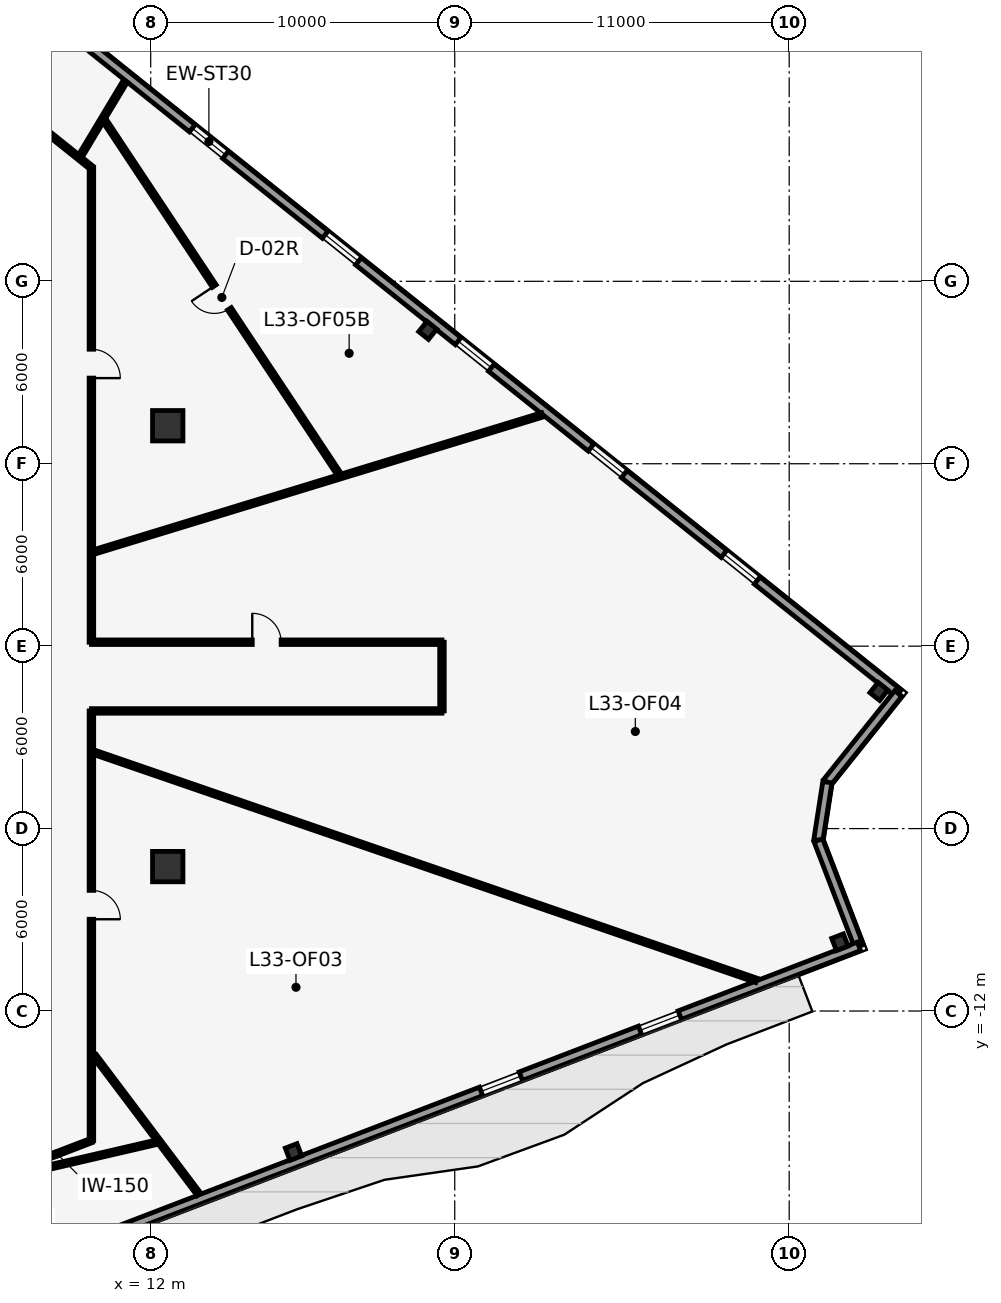
"""IFC4 building model, lengths in metres.
Left out: names, types, materials, properties, quantities, classifications, styles, units other than length and angle.
Written with IfcOpenShell. Run it as: python <this file> out.ifc"""

import sys

from ifc_helpers import new_model, si_unit, direction, frame, frame_2d, origin, origin_2d, place, context, subcontext, project, spatial, rectangle, i_section, extrude, element, fill, save


model = new_model("IFC4")
c1 = context("Model", 3, precision=1e-05, world=origin(), true_north=direction((0.0, 1.0)))
c2 = subcontext(c1, "Body", "Model", "MODEL_VIEW")
j1 = project(units=[si_unit("LENGTHUNIT", "METRE"), si_unit("PLANEANGLEUNIT", "RADIAN")], contexts=[c1])
p1 = place(None, origin())
s1 = spatial("IfcSite", under=j1, at=p1, CompositionType="ELEMENT")
p2 = place(p1, origin())
s2 = spatial("IfcBuilding", under=s1, at=p2, CompositionType="ELEMENT")
p3 = place(p2, frame((0.0, 0.0, 144.5)))
s3 = spatial("IfcBuildingStorey", under=s2, at=p3, CompositionType="ELEMENT", Elevation=144.5)
for number, where, z_axis, x_axis in (
    (1, (12.56, -7.25, 0.0), (0.0, 0.0, 1.0), (1.0, 0.0, 0.0)),
    (2, (12.56, 7.25, 0.0), (0.0, 0.0, 1.0), (1.0, 0.0, 0.0)),
):
    element("IfcColumn", number, at=place(p3, frame(where, z_axis=z_axis, x_axis=x_axis)), inside=s3, PredefinedType="COLUMN", context=c2, shape_type="SweptSolid", body=[
        extrude(rectangle(XDim=1.0, YDim=1.0, at=origin_2d()), origin(), (0.0, 0.0, 1.0), 4.1),
    ])
for number, where, z_axis, x_axis in (
    (3, (16.697, -16.638, 0.0), (0.0, 0.0, 1.0), (0.934, 0.358, 0.0)),
    (4, (34.669, -9.739, 0.0), (0.0, 0.0, 1.0), (0.934, 0.358, 0.0)),
    (5, (35.951, -1.489, 0.0), (0.0, 0.0, 1.0), (-0.781, 0.625, 0.0)),
    (6, (21.112, 10.387, 0.0), (0.0, 0.0, 1.0), (-0.781, 0.625, 0.0)),
):
    element("IfcColumn", number, at=place(p3, frame(where, z_axis=z_axis, x_axis=x_axis)), inside=s3, PredefinedType="COLUMN", context=c2, shape_type="SweptSolid", body=[
        extrude(i_section(OverallWidth=0.411, OverallDepth=0.434, WebThickness=0.036, FlangeThickness=0.057, at=origin_2d()), origin(), (0.0, 0.0, 1.0), 4.1),
    ])
p4 = place(p3, frame((-8.762, 34.748, 0.0), z_axis=(0.0, 0.0, 1.0), x_axis=(0.780669916438, -0.624943582708, 0.0)))
e7 = element("IfcWall", 7, at=p4, inside=s3, PredefinedType="STANDARD", context=c2, shape_type="SweptSolid", body=[
    extrude(rectangle(XDim=58.093, YDim=0.3, at=frame_2d((29.046, 0.0))), origin(), (0.0, 0.0, 1.0), 3.85),
])
p5 = place(p4, frame((5.947, 0.0, 0.85)))
e8 = element("IfcOpeningElement", 8, at=p5, cuts=e7, PredefinedType="OPENING", context=c2, shape_type="SweptSolid", body=[
    extrude(rectangle(XDim=1.4, YDim=2.2, at=frame_2d((0.7, 1.1))), frame((0.0, 0.16, 0.0), z_axis=(0.0, -1.0, 0.0), x_axis=(1.0, 0.0, 0.0)), (0.0, 0.0, 1.0), 0.32),
])
p6 = place(p4, frame((11.547, 0.0, 0.85)))
e9 = element("IfcOpeningElement", 9, at=p6, cuts=e7, PredefinedType="OPENING", context=c2, shape_type="SweptSolid", body=[
    extrude(rectangle(XDim=1.4, YDim=2.2, at=frame_2d((0.7, 1.1))), frame((0.0, 0.16, 0.0), z_axis=(0.0, -1.0, 0.0), x_axis=(1.0, 0.0, 0.0)), (0.0, 0.0, 1.0), 0.32),
])
p7 = place(p4, frame((17.146, 0.0, 0.85)))
e10 = element("IfcOpeningElement", 10, at=p7, cuts=e7, PredefinedType="OPENING", context=c2, shape_type="SweptSolid", body=[
    extrude(rectangle(XDim=1.4, YDim=2.2, at=frame_2d((0.7, 1.1))), frame((0.0, 0.16, 0.0), z_axis=(0.0, -1.0, 0.0), x_axis=(1.0, 0.0, 0.0)), (0.0, 0.0, 1.0), 0.32),
])
p8 = place(p4, frame((22.747, 0.0, 0.85)))
e11 = element("IfcOpeningElement", 11, at=p8, cuts=e7, PredefinedType="OPENING", context=c2, shape_type="SweptSolid", body=[
    extrude(rectangle(XDim=1.4, YDim=2.2, at=frame_2d((0.7, 1.1))), frame((0.0, 0.16, 0.0), z_axis=(0.0, -1.0, 0.0), x_axis=(1.0, 0.0, 0.0)), (0.0, 0.0, 1.0), 0.32),
])
p9 = place(p4, frame((28.347, 0.0, 0.85)))
e12 = element("IfcOpeningElement", 12, at=p9, cuts=e7, PredefinedType="OPENING", context=c2, shape_type="SweptSolid", body=[
    extrude(rectangle(XDim=1.4, YDim=2.2, at=frame_2d((0.7, 1.1))), frame((0.0, 0.16, 0.0), z_axis=(0.0, -1.0, 0.0), x_axis=(1.0, 0.0, 0.0)), (0.0, 0.0, 1.0), 0.32),
])
p10 = place(p4, frame((33.947, 0.0, 0.85)))
e13 = element("IfcOpeningElement", 13, at=p10, cuts=e7, PredefinedType="OPENING", context=c2, shape_type="SweptSolid", body=[
    extrude(rectangle(XDim=1.4, YDim=2.2, at=frame_2d((0.7, 1.1))), frame((0.0, 0.16, 0.0), z_axis=(0.0, -1.0, 0.0), x_axis=(1.0, 0.0, 0.0)), (0.0, 0.0, 1.0), 0.32),
])
p11 = place(p4, frame((39.547, 0.0, 0.85)))
e14 = element("IfcOpeningElement", 14, at=p11, cuts=e7, PredefinedType="OPENING", context=c2, shape_type="SweptSolid", body=[
    extrude(rectangle(XDim=1.4, YDim=2.2, at=frame_2d((0.7, 1.1))), frame((0.0, 0.16, 0.0), z_axis=(0.0, -1.0, 0.0), x_axis=(1.0, 0.0, 0.0)), (0.0, 0.0, 1.0), 0.32),
])
p12 = place(p4, frame((45.146, 0.0, 0.85)))
e15 = element("IfcOpeningElement", 15, at=p12, cuts=e7, PredefinedType="OPENING", context=c2, shape_type="SweptSolid", body=[
    extrude(rectangle(XDim=1.4, YDim=2.2, at=frame_2d((0.7, 1.1))), frame((0.0, 0.16, 0.0), z_axis=(0.0, -1.0, 0.0), x_axis=(1.0, 0.0, 0.0)), (0.0, 0.0, 1.0), 0.32),
])
p13 = place(p4, frame((50.747, 0.0, 0.85)))
e16 = element("IfcOpeningElement", 16, at=p13, cuts=e7, PredefinedType="OPENING", context=c2, shape_type="SweptSolid", body=[
    extrude(rectangle(XDim=1.4, YDim=2.2, at=frame_2d((0.7, 1.1))), frame((0.0, 0.16, 0.0), z_axis=(0.0, -1.0, 0.0), x_axis=(1.0, 0.0, 0.0)), (0.0, 0.0, 1.0), 0.32),
])
p14 = place(p3, frame((36.59, -1.557, 0.0), z_axis=(0.0, 0.0, 1.0), x_axis=(-0.62493402561, -0.780677567012, 0.0)))
e17 = element("IfcWall", 17, at=p14, inside=s3, PredefinedType="STANDARD", context=c2, shape_type="SweptSolid", body=[
    extrude(rectangle(XDim=3.737, YDim=0.3, at=frame_2d((1.869, 0.0))), origin(), (0.0, 0.0, 1.0), 3.85),
])
p15 = place(p3, frame((34.254, -4.474, 0.0), z_axis=(0.0, 0.0, 1.0), x_axis=(-0.153717968475, -0.988114763663, 0.0)))
e18 = element("IfcWall", 18, at=p15, inside=s3, PredefinedType="STANDARD", context=c2, shape_type="SweptSolid", body=[
    extrude(rectangle(XDim=1.933, YDim=0.3, at=frame_2d((0.966, 0.0))), origin(), (0.0, 0.0, 1.0), 3.85),
])
p16 = place(p3, frame((33.957, -6.384, 0.0), z_axis=(0.0, 0.0, 1.0), x_axis=(0.358344201462, -0.933589542186, 0.0)))
e19 = element("IfcWall", 19, at=p16, inside=s3, PredefinedType="STANDARD", context=c2, shape_type="SweptSolid", body=[
    extrude(rectangle(XDim=3.737, YDim=0.3, at=frame_2d((1.869, 0.0))), origin(), (0.0, 0.0, 1.0), 3.85),
])
p17 = place(p3, frame((35.296, -9.873, 0.0), z_axis=(0.0, 0.0, 1.0), x_axis=(-0.933580612554, -0.35836746485, 0.0)))
e20 = element("IfcWall", 20, at=p17, inside=s3, PredefinedType="STANDARD", context=c2, shape_type="SweptSolid", body=[
    extrude(rectangle(XDim=58.828, YDim=0.3, at=frame_2d((29.414, 0.0))), origin(), (0.0, 0.0, 1.0), 3.85),
])
p18 = place(p17, frame((28.914, 0.0, 0.0)))
e21 = element("IfcOpeningElement", 21, at=p18, cuts=e20, PredefinedType="OPENING", context=c2, shape_type="SweptSolid", body=[
    extrude(rectangle(XDim=1.0, YDim=2.15, at=frame_2d((0.5, 1.075))), frame((0.0, 0.16, 0.0), z_axis=(0.0, -1.0, 0.0), x_axis=(1.0, 0.0, 0.0)), (0.0, 0.0, 1.0), 0.32),
])
p19 = place(p17, frame((6.314, 0.0, 0.85)))
e22 = element("IfcOpeningElement", 22, at=p19, cuts=e20, PredefinedType="OPENING", context=c2, shape_type="SweptSolid", body=[
    extrude(rectangle(XDim=1.4, YDim=2.2, at=frame_2d((0.7, 1.1))), frame((0.0, 0.16, 0.0), z_axis=(0.0, -1.0, 0.0), x_axis=(1.0, 0.0, 0.0)), (0.0, 0.0, 1.0), 0.32),
])
p20 = place(p17, frame((11.914, 0.0, 0.85)))
e23 = element("IfcOpeningElement", 23, at=p20, cuts=e20, PredefinedType="OPENING", context=c2, shape_type="SweptSolid", body=[
    extrude(rectangle(XDim=1.4, YDim=2.2, at=frame_2d((0.7, 1.1))), frame((0.0, 0.16, 0.0), z_axis=(0.0, -1.0, 0.0), x_axis=(1.0, 0.0, 0.0)), (0.0, 0.0, 1.0), 0.32),
])
p21 = place(p17, frame((34.314, 0.0, 0.85)))
e24 = element("IfcOpeningElement", 24, at=p21, cuts=e20, PredefinedType="OPENING", context=c2, shape_type="SweptSolid", body=[
    extrude(rectangle(XDim=1.4, YDim=2.2, at=frame_2d((0.7, 1.1))), frame((0.0, 0.16, 0.0), z_axis=(0.0, -1.0, 0.0), x_axis=(1.0, 0.0, 0.0)), (0.0, 0.0, 1.0), 0.32),
])
p22 = place(p17, frame((45.514, 0.0, 0.85)))
e25 = element("IfcOpeningElement", 25, at=p22, cuts=e20, PredefinedType="OPENING", context=c2, shape_type="SweptSolid", body=[
    extrude(rectangle(XDim=1.4, YDim=2.2, at=frame_2d((0.7, 1.1))), frame((0.0, 0.16, 0.0), z_axis=(0.0, -1.0, 0.0), x_axis=(1.0, 0.0, 0.0)), (0.0, 0.0, 1.0), 0.32),
])
p23 = place(p17, frame((51.114, 0.0, 0.85)))
e26 = element("IfcOpeningElement", 26, at=p23, cuts=e20, PredefinedType="OPENING", context=c2, shape_type="SweptSolid", body=[
    extrude(rectangle(XDim=1.4, YDim=2.2, at=frame_2d((0.7, 1.1))), frame((0.0, 0.16, 0.0), z_axis=(0.0, -1.0, 0.0), x_axis=(1.0, 0.0, 0.0)), (0.0, 0.0, 1.0), 0.32),
])
p24 = place(p3, frame((10.05, -16.26, 0.0), z_axis=(0.0, 0.0, 1.0), x_axis=(-0.933561171802, -0.358418105713, 0.0)))
e27 = element("IfcWall", 27, at=p24, inside=s3, PredefinedType="PARTITIONING", context=c2, shape_type="SweptSolid", body=[
    extrude(rectangle(XDim=2.421, YDim=0.15, at=frame_2d((1.21, 0.0))), origin(), (0.0, 0.0, 1.0), 3.85),
])
p25 = place(p3, frame((7.79, 17.547, 0.0), z_axis=(0.0, 0.0, 1.0), x_axis=(0.780646621428, -0.624972681366, 0.0)))
e28 = element("IfcWall", 28, at=p25, inside=s3, PredefinedType="PARTITIONING", context=c2, shape_type="SweptSolid", body=[
    extrude(rectangle(XDim=2.895, YDim=0.15, at=frame_2d((1.448, 0.0))), origin(), (0.0, 0.0, 1.0), 3.85),
])
p26 = place(p3, frame((10.05, 15.737, 0.0), z_axis=(0.0, 0.0, 1.0), x_axis=(0.0, -1.0, 0.0)))
e29 = element("IfcWall", 29, at=p26, inside=s3, PredefinedType="PARTITIONING", context=c2, shape_type="SweptSolid", body=[
    extrude(rectangle(XDim=15.607, YDim=0.15, at=frame_2d((7.804, 0.0))), origin(), (0.0, 0.0, 1.0), 3.85),
])
p27 = place(p26, frame((5.971, 0.0, 0.0)))
e30 = element("IfcOpeningElement", 30, at=p27, cuts=e29, PredefinedType="OPENING", context=c2, shape_type="SweptSolid", body=[
    extrude(rectangle(XDim=0.95, YDim=2.15, at=frame_2d((0.475, 1.075))), frame((0.0, 0.085, 0.0), z_axis=(0.0, -1.0, 0.0), x_axis=(1.0, 0.0, 0.0)), (0.0, 0.0, 1.0), 0.17),
])
p28 = place(p3, frame((10.05, 0.13, 0.0), z_axis=(0.0, 0.0, 1.0), x_axis=(1.0, 0.0, 0.0)))
e31 = element("IfcWall", 31, at=p28, inside=s3, PredefinedType="PARTITIONING", context=c2, shape_type="SweptSolid", body=[
    extrude(rectangle(XDim=11.53, YDim=0.15, at=frame_2d((5.765, 0.0))), origin(), (0.0, 0.0, 1.0), 3.85),
])
p29 = place(p28, frame((5.29, 0.0, 0.0)))
e32 = element("IfcOpeningElement", 32, at=p29, cuts=e31, PredefinedType="OPENING", context=c2, shape_type="SweptSolid", body=[
    extrude(rectangle(XDim=0.95, YDim=2.15, at=frame_2d((0.475, 1.075))), frame((0.0, 0.085, 0.0), z_axis=(0.0, -1.0, 0.0), x_axis=(1.0, 0.0, 0.0)), (0.0, 0.0, 1.0), 0.17),
])
p30 = place(p3, frame((21.58, 0.13, 0.0), z_axis=(0.0, 0.0, 1.0), x_axis=(0.0, -1.0, 0.0)))
e33 = element("IfcWall", 33, at=p30, inside=s3, PredefinedType="PARTITIONING", context=c2, shape_type="SweptSolid", body=[
    extrude(rectangle(XDim=2.26, YDim=0.15, at=frame_2d((1.13, 0.0))), origin(), (0.0, 0.0, 1.0), 3.85),
])
p31 = place(p3, frame((21.58, -2.13, 0.0), z_axis=(0.0, 0.0, 1.0), x_axis=(-1.0, 0.0, 0.0)))
e34 = element("IfcWall", 34, at=p31, inside=s3, PredefinedType="PARTITIONING", context=c2, shape_type="SweptSolid", body=[
    extrude(rectangle(XDim=11.53, YDim=0.15, at=frame_2d((5.765, 0.0))), origin(), (0.0, 0.0, 1.0), 3.85),
])
p32 = place(p3, frame((10.05, -2.13, 0.0), z_axis=(0.0, 0.0, 1.0), x_axis=(0.0, -1.0, 0.0)))
e35 = element("IfcWall", 35, at=p32, inside=s3, PredefinedType="PARTITIONING", context=c2, shape_type="SweptSolid", body=[
    extrude(rectangle(XDim=14.13, YDim=0.15, at=frame_2d((7.065, 0.0))), origin(), (0.0, 0.0, 1.0), 3.85),
])
p33 = place(p32, frame((5.902, 0.0, 0.0)))
e36 = element("IfcOpeningElement", 36, at=p33, cuts=e35, PredefinedType="OPENING", context=c2, shape_type="SweptSolid", body=[
    extrude(rectangle(XDim=0.95, YDim=2.15, at=frame_2d((0.475, 1.075))), frame((0.0, 0.085, 0.0), z_axis=(0.0, -1.0, 0.0), x_axis=(1.0, 0.0, 0.0)), (0.0, 0.0, 1.0), 0.17),
])
p34 = place(p3, frame((10.155, 3.105, 0.0), z_axis=(0.0, 0.0, 1.0), x_axis=(0.956304415169, 0.292372819408, 0.0)))
e37 = element("IfcWall", 37, at=p34, inside=s3, PredefinedType="PARTITIONING", context=c2, shape_type="SweptSolid", body=[
    extrude(rectangle(XDim=15.397, YDim=0.15, at=frame_2d((7.699, 0.0))), origin(), (0.0, 0.0, 1.0), 3.85),
])
p35 = place(p3, frame((9.704, 16.149, 0.0), z_axis=(0.0, 0.0, 1.0), x_axis=(0.515051836846, 0.857159031547, 0.0)))
e38 = element("IfcWall", 38, at=p35, inside=s3, PredefinedType="PARTITIONING", context=c2, shape_type="SweptSolid", body=[
    extrude(rectangle(XDim=2.84, YDim=0.15, at=frame_2d((1.42, 0.0))), origin(), (0.0, 0.0, 1.0), 3.85),
])
p36 = place(p3, frame((10.155, -13.476, 0.0), z_axis=(0.0, 0.0, 1.0), x_axis=(0.601807099294, -0.798641481041, 0.0)))
e39 = element("IfcWall", 39, at=p36, inside=s3, PredefinedType="PARTITIONING", context=c2, shape_type="SweptSolid", body=[
    extrude(rectangle(XDim=5.702, YDim=0.15, at=frame_2d((2.851, 0.0))), origin(), (0.0, 0.0, 1.0), 3.85),
])
p37 = place(p3, frame((10.155, -3.497, 0.0), z_axis=(0.0, 0.0, 1.0), x_axis=(0.945516019474, -0.325575577889, 0.0)))
e40 = element("IfcWall", 40, at=p37, inside=s3, PredefinedType="PARTITIONING", context=c2, shape_type="SweptSolid", body=[
    extrude(rectangle(XDim=23.021, YDim=0.15, at=frame_2d((11.511, 0.0))), origin(), (0.0, 0.0, 1.0), 2.898),
])
p38 = place(p3, frame((-1.684, -19.533, 0.0), z_axis=(0.0, 0.0, 1.0), x_axis=(0.974168973581, 0.225820306685, 0.0)))
e41 = element("IfcWall", 41, at=p38, inside=s3, PredefinedType="PARTITIONING", context=c2, shape_type="SweptSolid", body=[
    extrude(rectangle(XDim=14.307, YDim=0.15, at=frame_2d((7.153, 0.0))), origin(), (0.0, 0.0, 1.0), 3.85),
])
p39 = place(p38, frame((6.703, 0.0, 0.0)))
e42 = element("IfcOpeningElement", 42, at=p39, cuts=e41, PredefinedType="OPENING", context=c2, shape_type="SweptSolid", body=[
    extrude(rectangle(XDim=0.9, YDim=2.1, at=frame_2d((0.45, 1.05))), frame((0.0, 0.085, 0.0), z_axis=(0.0, -1.0, 0.0), x_axis=(1.0, 0.0, 0.0)), (0.0, 0.0, 1.0), 0.17),
])
p40 = place(p3, frame((18.233, 5.6, 0.0), z_axis=(0.0, 0.0, 1.0), x_axis=(-0.552746716733, 0.833349306798, 0.0)))
e43 = element("IfcWall", 43, at=p40, inside=s3, PredefinedType="PARTITIONING", context=c2, shape_type="SweptSolid", body=[
    extrude(rectangle(XDim=14.085, YDim=0.15, at=frame_2d((7.043, 0.0))), origin(), (0.0, 0.0, 1.0), 3.85),
])
p41 = place(p40, frame((6.593, 0.0, 0.0)))
e44 = element("IfcOpeningElement", 44, at=p41, cuts=e43, PredefinedType="OPENING", context=c2, shape_type="SweptSolid", body=[
    extrude(rectangle(XDim=0.9, YDim=2.1, at=frame_2d((0.45, 1.05))), frame((0.0, 0.085, 0.0), z_axis=(0.0, -1.0, 0.0), x_axis=(1.0, 0.0, 0.0)), (0.0, 0.0, 1.0), 0.17),
])
p42 = place(p9, origin())
e45 = element("IfcWindow", 45, at=p42, inside=s3, PartitioningType="SINGLE_PANEL", PredefinedType="WINDOW", context=c2, shape_type="SweptSolid", body=[
    extrude(rectangle(XDim=1.4, YDim=2.2, at=frame_2d((0.7, 1.1))), frame((0.0, 0.03, 0.0), z_axis=(0.0, -1.0, 0.0), x_axis=(1.0, 0.0, 0.0)), (0.0, 0.0, 1.0), 0.06),
])
fill(e12, e45)
p43 = place(p10, origin())
e46 = element("IfcWindow", 46, at=p43, inside=s3, PartitioningType="SINGLE_PANEL", PredefinedType="WINDOW", context=c2, shape_type="SweptSolid", body=[
    extrude(rectangle(XDim=1.4, YDim=2.2, at=frame_2d((0.7, 1.1))), frame((0.0, 0.03, 0.0), z_axis=(0.0, -1.0, 0.0), x_axis=(1.0, 0.0, 0.0)), (0.0, 0.0, 1.0), 0.06),
])
fill(e13, e46)
p44 = place(p11, origin())
e47 = element("IfcWindow", 47, at=p44, inside=s3, PartitioningType="SINGLE_PANEL", PredefinedType="WINDOW", context=c2, shape_type="SweptSolid", body=[
    extrude(rectangle(XDim=1.4, YDim=2.2, at=frame_2d((0.7, 1.1))), frame((0.0, 0.03, 0.0), z_axis=(0.0, -1.0, 0.0), x_axis=(1.0, 0.0, 0.0)), (0.0, 0.0, 1.0), 0.06),
])
fill(e14, e47)
p45 = place(p12, origin())
e48 = element("IfcWindow", 48, at=p45, inside=s3, PartitioningType="SINGLE_PANEL", PredefinedType="WINDOW", context=c2, shape_type="SweptSolid", body=[
    extrude(rectangle(XDim=1.4, YDim=2.2, at=frame_2d((0.7, 1.1))), frame((0.0, 0.03, 0.0), z_axis=(0.0, -1.0, 0.0), x_axis=(1.0, 0.0, 0.0)), (0.0, 0.0, 1.0), 0.06),
])
fill(e15, e48)
p46 = place(p13, origin())
e49 = element("IfcWindow", 49, at=p46, inside=s3, PartitioningType="SINGLE_PANEL", PredefinedType="WINDOW", context=c2, shape_type="SweptSolid", body=[
    extrude(rectangle(XDim=1.4, YDim=2.2, at=frame_2d((0.7, 1.1))), frame((0.0, 0.03, 0.0), z_axis=(0.0, -1.0, 0.0), x_axis=(1.0, 0.0, 0.0)), (0.0, 0.0, 1.0), 0.06),
])
fill(e16, e49)
p47 = place(p19, origin())
e50 = element("IfcWindow", 50, at=p47, inside=s3, PartitioningType="SINGLE_PANEL", PredefinedType="WINDOW", context=c2, shape_type="SweptSolid", body=[
    extrude(rectangle(XDim=1.4, YDim=2.2, at=frame_2d((0.7, 1.1))), frame((0.0, 0.03, 0.0), z_axis=(0.0, -1.0, 0.0), x_axis=(1.0, 0.0, 0.0)), (0.0, 0.0, 1.0), 0.06),
])
fill(e22, e50)
p48 = place(p20, origin())
e51 = element("IfcWindow", 51, at=p48, inside=s3, PartitioningType="SINGLE_PANEL", PredefinedType="WINDOW", context=c2, shape_type="SweptSolid", body=[
    extrude(rectangle(XDim=1.4, YDim=2.2, at=frame_2d((0.7, 1.1))), frame((0.0, 0.03, 0.0), z_axis=(0.0, -1.0, 0.0), x_axis=(1.0, 0.0, 0.0)), (0.0, 0.0, 1.0), 0.06),
])
fill(e23, e51)
p49 = place(p41, origin())
e52 = element("IfcDoor", 52, at=p49, inside=s3, OperationType="SINGLE_SWING_RIGHT", PredefinedType="DOOR", context=c2, shape_type="SweptSolid", body=[
    extrude(rectangle(XDim=0.9, YDim=2.1, at=frame_2d((0.45, 1.05))), frame((0.0, 0.025, 0.0), z_axis=(0.0, -1.0, 0.0), x_axis=(1.0, 0.0, 0.0)), (0.0, 0.0, 1.0), 0.05),
])
fill(e44, e52)
p50 = place(p33, origin())
e53 = element("IfcDoor", 53, at=p50, inside=s3, OperationType="SINGLE_SWING_RIGHT", PredefinedType="DOOR", context=c2, shape_type="SweptSolid", body=[
    extrude(rectangle(XDim=0.95, YDim=2.15, at=frame_2d((0.475, 1.075))), frame((0.0, 0.025, 0.0), z_axis=(0.0, -1.0, 0.0), x_axis=(1.0, 0.0, 0.0)), (0.0, 0.0, 1.0), 0.05),
])
fill(e36, e53)
p51 = place(p29, origin())
e54 = element("IfcDoor", 54, at=p51, inside=s3, OperationType="SINGLE_SWING_LEFT", PredefinedType="DOOR", context=c2, shape_type="SweptSolid", body=[
    extrude(rectangle(XDim=0.95, YDim=2.15, at=frame_2d((0.475, 1.075))), frame((0.0, 0.025, 0.0), z_axis=(0.0, -1.0, 0.0), x_axis=(1.0, 0.0, 0.0)), (0.0, 0.0, 1.0), 0.05),
])
fill(e32, e54)
p52 = place(p27, origin())
e55 = element("IfcDoor", 55, at=p52, inside=s3, OperationType="SINGLE_SWING_RIGHT", PredefinedType="DOOR", context=c2, shape_type="SweptSolid", body=[
    extrude(rectangle(XDim=0.95, YDim=2.15, at=frame_2d((0.475, 1.075))), frame((0.0, 0.025, 0.0), z_axis=(0.0, -1.0, 0.0), x_axis=(1.0, 0.0, 0.0)), (0.0, 0.0, 1.0), 0.05),
])
fill(e30, e55)
save(model, sys.argv[1])
